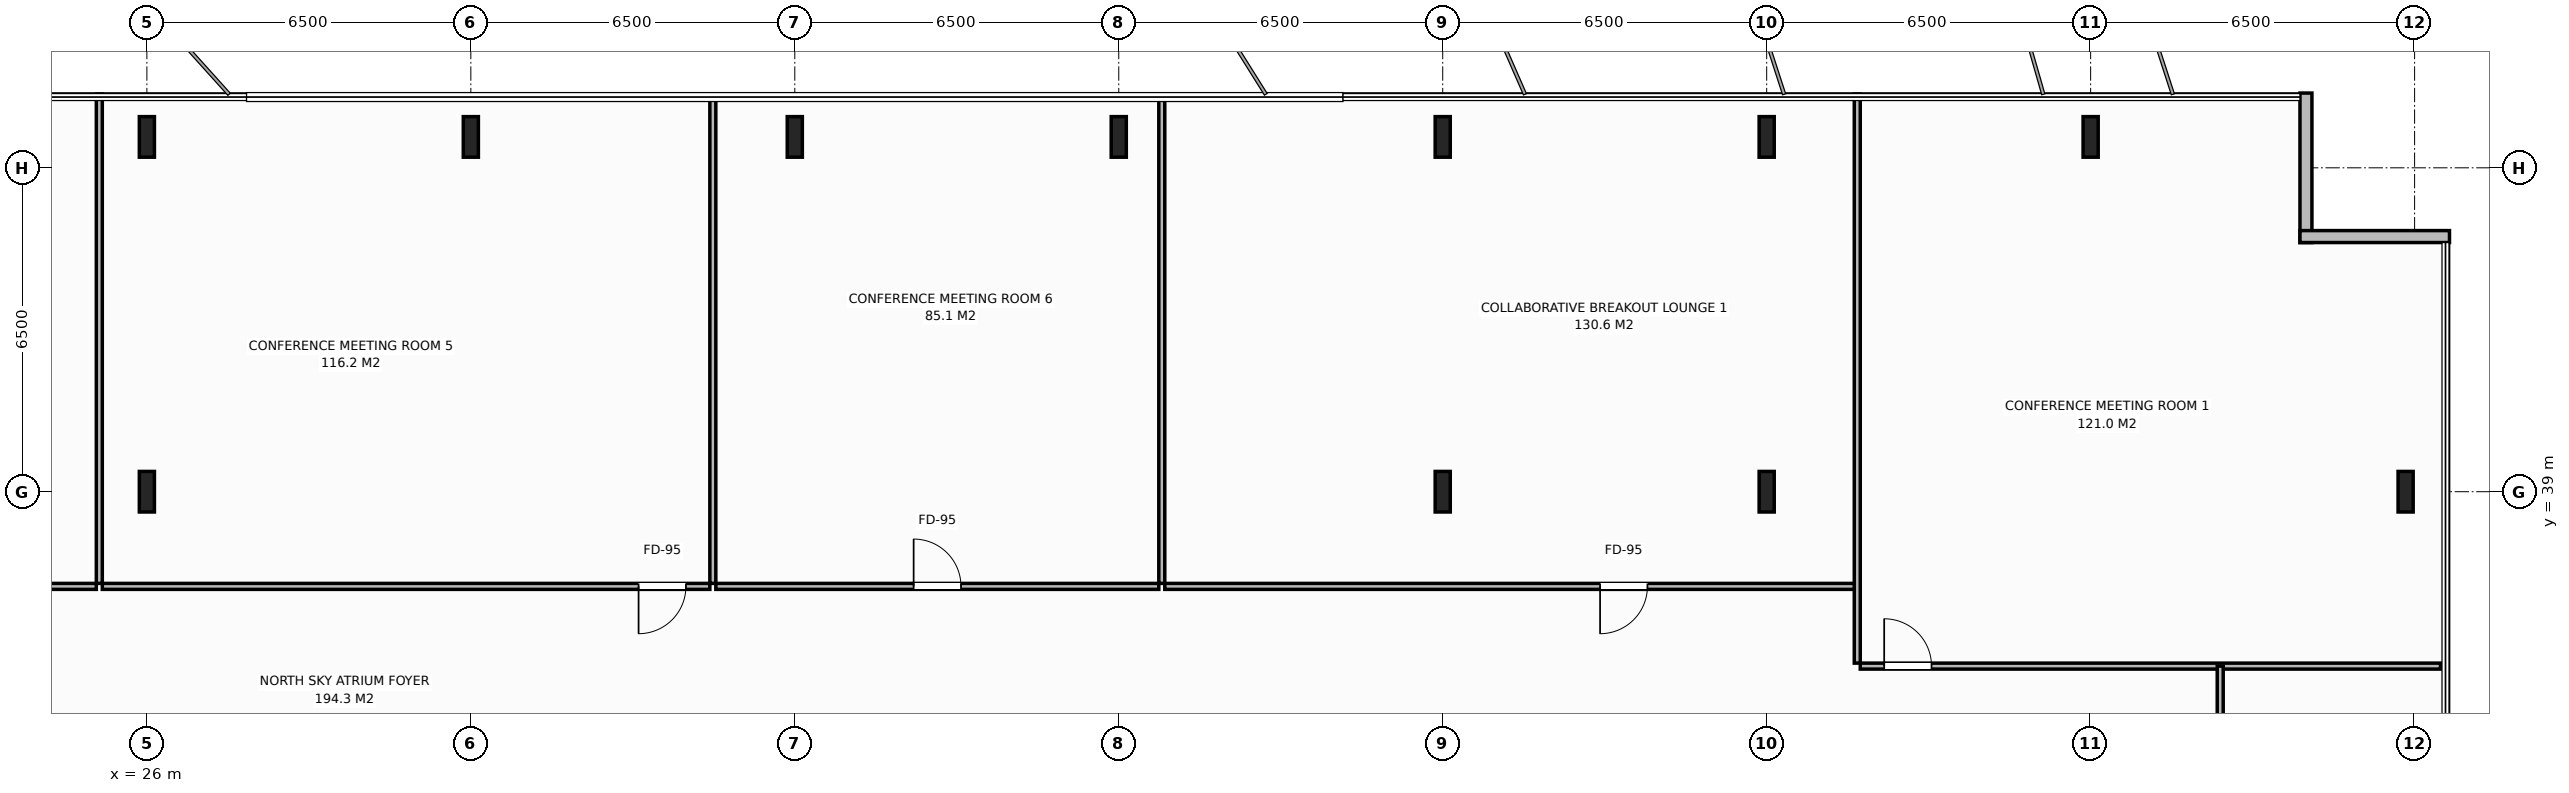
"""IFC4 building model, lengths in metres.
Left out: names, types, materials, properties, quantities, classifications, styles, units other than length and angle.
Written with IfcOpenShell. Run it as: python <this file> out.ifc"""

import sys

from ifc_helpers import new_model, si_unit, direction, frame, frame_2d, origin, origin_2d, place, context, subcontext, project, spatial, rectangle, i_section, extrude, element, fill, save


model = new_model("IFC4")
c1 = context("Model", 3, precision=1e-05, world=origin(), true_north=direction((0.0, 1.0)))
c2 = subcontext(c1, "Body", "Model", "MODEL_VIEW")
j1 = project(units=[si_unit("LENGTHUNIT", "METRE"), si_unit("PLANEANGLEUNIT", "RADIAN")], contexts=[c1])
p1 = place(None, origin())
s1 = spatial("IfcSite", under=j1, at=p1, CompositionType="ELEMENT")
p2 = place(p1, origin())
s2 = spatial("IfcBuilding", under=s1, at=p2, CompositionType="ELEMENT")
p3 = place(p2, frame((0.0, 0.0, 244.2)))
s3 = spatial("IfcBuildingStorey", under=s2, at=p3, CompositionType="ELEMENT", Elevation=244.2)
for number, where, z_axis, x_axis in (
    (1, (58.5, 39.0, 0.0), (0.0, 0.0, 1.0), (1.0, 0.0, 0.0)),
    (2, (26.0, 39.0, 0.0), (0.0, 0.0, 1.0), (1.0, 0.0, 0.0)),
    (3, (52.0, 39.0, 0.0), (0.0, 0.0, 1.0), (1.0, 0.0, 0.0)),
    (4, (26.0, 46.12, 0.0), (0.0, 0.0, 1.0), (1.0, 0.0, 0.0)),
    (5, (32.5, 46.12, 0.0), (0.0, 0.0, 1.0), (1.0, 0.0, 0.0)),
    (6, (39.0, 46.12, 0.0), (0.0, 0.0, 1.0), (1.0, 0.0, 0.0)),
    (7, (45.5, 46.12, 0.0), (0.0, 0.0, 1.0), (1.0, 0.0, 0.0)),
    (8, (52.0, 46.12, 0.0), (0.0, 0.0, 1.0), (1.0, 0.0, 0.0)),
    (9, (58.5, 46.12, 0.0), (0.0, 0.0, 1.0), (1.0, 0.0, 0.0)),
    (10, (65.0, 46.12, 0.0), (0.0, 0.0, 1.0), (1.0, 0.0, 0.0)),
    (11, (71.32, 39.0, 0.0), (0.0, 0.0, 1.0), (1.0, 0.0, 0.0)),
):
    element("IfcColumn", number, at=place(p3, frame(where, z_axis=z_axis, x_axis=x_axis)), inside=s3, PredefinedType="COLUMN", context=c2, shape_type="SweptSolid", body=[
        extrude(i_section(OverallWidth=0.303, OverallDepth=0.814, WebThickness=0.021, FlangeThickness=0.04, at=origin_2d()), origin(), (0.0, 0.0, 1.0), 3.8),
    ])
for number, where, z_axis, x_axis in (
    (12, (69.32, 47.0, 0.0), (0.0, 0.0, 1.0), (0.0, -1.0, 0.0)),
    (13, (69.2, 44.12, 0.0), (0.0, 0.0, 1.0), (1.0, 0.0, 0.0)),
):
    element("IfcWall", number, at=place(p3, frame(where, z_axis=z_axis, x_axis=x_axis)), inside=s3, PredefinedType="STANDARD", context=c2, shape_type="SweptSolid", body=[
        extrude(rectangle(XDim=3.0, YDim=0.24, at=frame_2d((1.5, 0.0))), origin(), (0.0, 0.0, 1.0), 3.58),
    ])
p4 = place(p3, frame((25.046, 37.16, 0.0), z_axis=(0.0, 0.0, 1.0), x_axis=(0.0, 1.0, 0.0)))
e14 = element("IfcWall", 14, at=p4, inside=s3, PredefinedType="PARTITIONING", context=c2, shape_type="SweptSolid", body=[
    extrude(rectangle(XDim=9.82, YDim=0.12, at=frame_2d((4.91, 0.0))), origin(), (0.0, 0.0, 1.0), 3.58),
])
p5 = place(p3, frame((17.742, 37.1, 0.0), z_axis=(0.0, 0.0, 1.0), x_axis=(1.0, 0.0, 0.0)))
e15 = element("IfcWall", 15, at=p5, inside=s3, PredefinedType="PARTITIONING", context=c2, shape_type="SweptSolid", body=[
    extrude(rectangle(XDim=7.243, YDim=0.12, at=frame_2d((3.622, 0.0))), origin(), (0.0, 0.0, 1.0), 3.58),
])
p6 = place(p5, frame((3.147, 0.0, 0.0)))
e16 = element("IfcOpeningElement", 16, at=p6, cuts=e15, PredefinedType="OPENING", context=c2, shape_type="SweptSolid", body=[
    extrude(rectangle(XDim=0.95, YDim=2.15, at=frame_2d((0.475, 1.075))), frame((0.0, 0.07, 0.0), z_axis=(0.0, -1.0, 0.0), x_axis=(1.0, 0.0, 0.0)), (0.0, 0.0, 1.0), 0.14),
])
p7 = place(p3, frame((37.356, 37.16, 0.0), z_axis=(0.0, 0.0, 1.0), x_axis=(0.0, 1.0, 0.0)))
e17 = element("IfcWall", 17, at=p7, inside=s3, PredefinedType="PARTITIONING", context=c2, shape_type="SweptSolid", body=[
    extrude(rectangle(XDim=9.82, YDim=0.12, at=frame_2d((4.91, 0.0))), origin(), (0.0, 0.0, 1.0), 3.58),
])
p8 = place(p3, frame((25.106, 37.1, 0.0), z_axis=(0.0, 0.0, 1.0), x_axis=(1.0, 0.0, 0.0)))
e18 = element("IfcWall", 18, at=p8, inside=s3, PredefinedType="PARTITIONING", context=c2, shape_type="SweptSolid", body=[
    extrude(rectangle(XDim=12.19, YDim=0.12, at=frame_2d((6.095, 0.0))), origin(), (0.0, 0.0, 1.0), 3.58),
])
p9 = place(p8, frame((10.76, 0.0, 0.0)))
e19 = element("IfcOpeningElement", 19, at=p9, cuts=e18, PredefinedType="OPENING", context=c2, shape_type="SweptSolid", body=[
    extrude(rectangle(XDim=0.95, YDim=2.15, at=frame_2d((0.475, 1.075))), frame((0.0, 0.07, 0.0), z_axis=(0.0, -1.0, 0.0), x_axis=(1.0, 0.0, 0.0)), (0.0, 0.0, 1.0), 0.14),
])
p10 = place(p3, frame((46.364, 37.16, 0.0), z_axis=(0.0, 0.0, 1.0), x_axis=(0.0, 1.0, 0.0)))
e20 = element("IfcWall", 20, at=p10, inside=s3, PredefinedType="PARTITIONING", context=c2, shape_type="SweptSolid", body=[
    extrude(rectangle(XDim=9.82, YDim=0.12, at=frame_2d((4.91, 0.0))), origin(), (0.0, 0.0, 1.0), 3.58),
])
p11 = place(p3, frame((37.416, 37.1, 0.0), z_axis=(0.0, 0.0, 1.0), x_axis=(1.0, 0.0, 0.0)))
e21 = element("IfcWall", 21, at=p11, inside=s3, PredefinedType="PARTITIONING", context=c2, shape_type="SweptSolid", body=[
    extrude(rectangle(XDim=8.888, YDim=0.12, at=frame_2d((4.444, 0.0))), origin(), (0.0, 0.0, 1.0), 3.58),
])
p12 = place(p11, frame((3.969, 0.0, 0.0)))
e22 = element("IfcOpeningElement", 22, at=p12, cuts=e21, PredefinedType="OPENING", context=c2, shape_type="SweptSolid", body=[
    extrude(rectangle(XDim=0.95, YDim=2.15, at=frame_2d((0.475, 1.075))), frame((0.0, 0.07, 0.0), z_axis=(0.0, -1.0, 0.0), x_axis=(1.0, 0.0, 0.0)), (0.0, 0.0, 1.0), 0.14),
])
p13 = place(p3, frame((60.318, 35.56, 0.0), z_axis=(0.0, 0.0, 1.0), x_axis=(0.0, 1.0, 0.0)))
e23 = element("IfcWall", 23, at=p13, inside=s3, PredefinedType="PARTITIONING", context=c2, shape_type="SweptSolid", body=[
    extrude(rectangle(XDim=11.42, YDim=0.12, at=frame_2d((5.71, 0.0))), origin(), (0.0, 0.0, 1.0), 3.58),
])
p14 = place(p3, frame((46.424, 37.1, 0.0), z_axis=(0.0, 0.0, 1.0), x_axis=(1.0, 0.0, 0.0)))
e24 = element("IfcWall", 24, at=p14, inside=s3, PredefinedType="PARTITIONING", context=c2, shape_type="SweptSolid", body=[
    extrude(rectangle(XDim=13.834, YDim=0.12, at=frame_2d((6.917, 0.0))), origin(), (0.0, 0.0, 1.0), 3.58),
])
p15 = place(p14, frame((8.734, 0.0, 0.0)))
e25 = element("IfcOpeningElement", 25, at=p15, cuts=e24, PredefinedType="OPENING", context=c2, shape_type="SweptSolid", body=[
    extrude(rectangle(XDim=0.95, YDim=2.15, at=frame_2d((0.475, 1.075))), frame((0.0, 0.07, 0.0), z_axis=(0.0, -1.0, 0.0), x_axis=(1.0, 0.0, 0.0)), (0.0, 0.0, 1.0), 0.14),
])
p16 = place(p3, frame((60.378, 35.5, 0.0), z_axis=(0.0, 0.0, 1.0), x_axis=(1.0, 0.0, 0.0)))
e26 = element("IfcWall", 26, at=p16, inside=s3, PredefinedType="PARTITIONING", context=c2, shape_type="SweptSolid", body=[
    extrude(rectangle(XDim=11.642, YDim=0.12, at=frame_2d((5.821, 0.0))), origin(), (0.0, 0.0, 1.0), 3.58),
])
p17 = place(p16, frame((0.48, 0.0, 0.0)))
e27 = element("IfcOpeningElement", 27, at=p17, cuts=e26, PredefinedType="OPENING", context=c2, shape_type="SweptSolid", body=[
    extrude(rectangle(XDim=0.95, YDim=2.15, at=frame_2d((0.475, 1.075))), frame((0.0, 0.07, 0.0), z_axis=(0.0, -1.0, 0.0), x_axis=(1.0, 0.0, 0.0)), (0.0, 0.0, 1.0), 0.14),
])
p18 = place(p3, frame((67.6, 27.05, 0.0), z_axis=(0.0, 0.0, 1.0), x_axis=(0.0, 1.0, 0.0)))
e28 = element("IfcWall", 28, at=p18, inside=s3, PredefinedType="PARTITIONING", context=c2, shape_type="SweptSolid", body=[
    extrude(rectangle(XDim=8.45, YDim=0.12, at=frame_2d((4.225, 0.0))), origin(), (0.0, 0.0, 1.0), 3.58),
])
p19 = place(p18, frame((2.7, 0.0, 0.0)))
e29 = element("IfcOpeningElement", 29, at=p19, cuts=e28, PredefinedType="OPENING", context=c2, shape_type="SweptSolid", body=[
    extrude(rectangle(XDim=0.95, YDim=2.15, at=frame_2d((0.475, 1.075))), frame((0.0, 0.07, 0.0), z_axis=(0.0, -1.0, 0.0), x_axis=(1.0, 0.0, 0.0)), (0.0, 0.0, 1.0), 0.14),
])
p20 = place(p9, origin())
e30 = element("IfcDoor", 30, at=p20, inside=s3, OperationType="SINGLE_SWING_RIGHT", PredefinedType="DOOR", context=c2, shape_type="SweptSolid", body=[
    extrude(rectangle(XDim=0.95, YDim=2.15, at=frame_2d((0.475, 1.075))), frame((0.0, 0.025, 0.0), z_axis=(0.0, -1.0, 0.0), x_axis=(1.0, 0.0, 0.0)), (0.0, 0.0, 1.0), 0.05),
])
fill(e19, e30)
p21 = place(p12, origin())
e31 = element("IfcDoor", 31, at=p21, inside=s3, OperationType="SINGLE_SWING_LEFT", PredefinedType="DOOR", context=c2, shape_type="SweptSolid", body=[
    extrude(rectangle(XDim=0.95, YDim=2.15, at=frame_2d((0.475, 1.075))), frame((0.0, 0.025, 0.0), z_axis=(0.0, -1.0, 0.0), x_axis=(1.0, 0.0, 0.0)), (0.0, 0.0, 1.0), 0.05),
])
fill(e22, e31)
p22 = place(p15, origin())
e32 = element("IfcDoor", 32, at=p22, inside=s3, OperationType="SINGLE_SWING_RIGHT", PredefinedType="DOOR", context=c2, shape_type="SweptSolid", body=[
    extrude(rectangle(XDim=0.95, YDim=2.15, at=frame_2d((0.475, 1.075))), frame((0.0, 0.025, 0.0), z_axis=(0.0, -1.0, 0.0), x_axis=(1.0, 0.0, 0.0)), (0.0, 0.0, 1.0), 0.05),
])
fill(e25, e32)
p23 = place(p17, origin())
e33 = element("IfcDoor", 33, at=p23, inside=s3, OperationType="SINGLE_SWING_LEFT", PredefinedType="DOOR", context=c2, shape_type="SweptSolid", body=[
    extrude(rectangle(XDim=0.95, YDim=2.15, at=frame_2d((0.475, 1.075))), frame((0.0, 0.025, 0.0), z_axis=(0.0, -1.0, 0.0), x_axis=(1.0, 0.0, 0.0)), (0.0, 0.0, 1.0), 0.05),
])
fill(e27, e33)
save(model, sys.argv[1])
